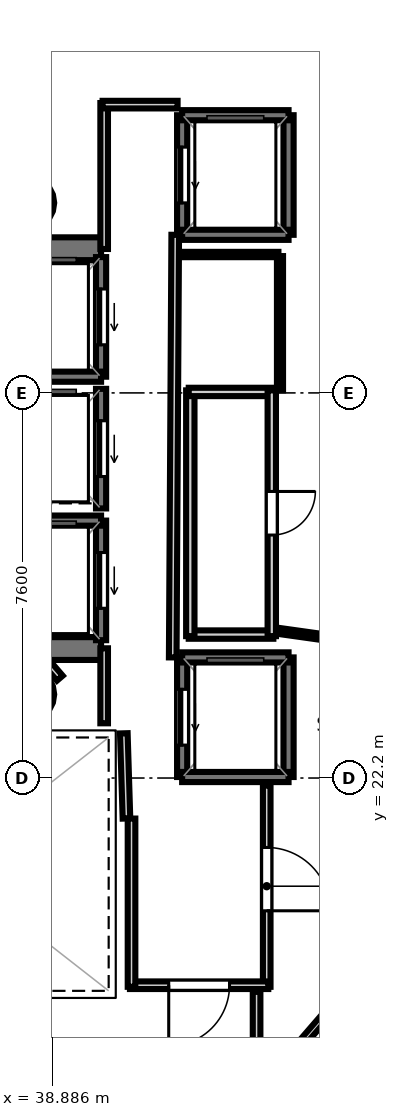
"""IFC4 building model, lengths in metres.
Left out: names, types, materials, properties, quantities, classifications, styles, units other than length and angle.
Written with IfcOpenShell. Run it as: python <this file> out.ifc"""

import sys

from ifc_helpers import new_model, si_unit, direction, frame, frame_2d, origin, origin_2d, place, context, subcontext, project, spatial, rectangle, hollow_circle, extrude, element, fill, save


model = new_model("IFC4")
c1 = context("Model", 3, precision=1e-05, world=origin(), true_north=direction((0.0, 1.0)))
c2 = subcontext(c1, "Body", "Model", "MODEL_VIEW")
j1 = project(units=[si_unit("LENGTHUNIT", "METRE"), si_unit("PLANEANGLEUNIT", "RADIAN")], contexts=[c1])
p1 = place(None, origin())
s1 = spatial("IfcSite", under=j1, at=p1, CompositionType="ELEMENT")
p2 = place(p1, origin())
s2 = spatial("IfcBuilding", under=s1, at=p2, CompositionType="ELEMENT")
p3 = place(p2, frame((0.0, 0.0, 253.8)))
s3 = spatial("IfcBuildingStorey", under=s2, at=p3, CompositionType="ELEMENT", Elevation=253.8)
p4 = place(p3, frame((29.33, 32.645, 0.0), z_axis=(0.0, 0.0, 1.0), x_axis=(1.0, 0.0, 0.0)))
e1 = element("IfcWall", 1, at=p4, inside=s3, PredefinedType="SHEAR", context=c2, shape_type="SweptSolid", body=[
    extrude(rectangle(XDim=10.52, YDim=0.45, at=frame_2d((5.26, 0.0))), origin(), (0.0, 0.0, 1.0), 3.52),
])
p5 = place(p4, frame((0.895, 0.0, 0.0)))
e2 = element("IfcOpeningElement", 2, at=p5, cuts=e1, PredefinedType="OPENING", context=c2, shape_type="SweptSolid", body=[
    extrude(rectangle(XDim=1.25, YDim=2.15, at=frame_2d((0.625, 1.075))), frame((0.0, 0.235, 0.0), z_axis=(0.0, -1.0, 0.0), x_axis=(1.0, 0.0, 0.0)), (0.0, 0.0, 1.0), 0.47),
])
p6 = place(p3, frame((29.33, 24.755, 0.0), z_axis=(0.0, 0.0, 1.0), x_axis=(1.0, 0.0, 0.0)))
e3 = element("IfcWall", 3, at=p6, inside=s3, PredefinedType="SHEAR", context=c2, shape_type="SweptSolid", body=[
    extrude(rectangle(XDim=10.52, YDim=0.45, at=frame_2d((5.26, 0.0))), origin(), (0.0, 0.0, 1.0), 3.52),
])
p7 = place(p6, frame((0.695, 0.0, 0.0)))
e4 = element("IfcOpeningElement", 4, at=p7, cuts=e3, PredefinedType="OPENING", context=c2, shape_type="SweptSolid", body=[
    extrude(rectangle(XDim=1.25, YDim=2.15, at=frame_2d((0.625, 1.075))), frame((0.0, 0.235, 0.0), z_axis=(0.0, -1.0, 0.0), x_axis=(1.0, 0.0, 0.0)), (0.0, 0.0, 1.0), 0.47),
])
for number, where, z_axis, x_axis in (
    (5, (38.4, 33.55, 0.0), (0.0, 0.0, 1.0), (1.0, 0.0, 0.0)),
    (6, (38.4, 23.85, 0.0), (0.0, 0.0, 1.0), (1.0, 0.0, 0.0)),
):
    element("IfcColumn", number, at=place(p3, frame(where, z_axis=z_axis, x_axis=x_axis)), inside=s3, PredefinedType="COLUMN", context=c2, shape_type="SweptSolid", body=[
        extrude(hollow_circle(Radius=0.525, WallThickness=0.028, at=origin_2d()), origin(), (0.0, 0.0, 1.0), 3.7),
    ])
p8 = place(p3, frame((39.85, 30.12, 0.0), z_axis=(0.0, 0.0, 1.0), x_axis=(0.0, 1.0, 0.0)))
e7 = element("IfcWall", 7, at=p8, inside=s3, PredefinedType="SOLIDWALL", context=c2, shape_type="SweptSolid", body=[
    extrude(rectangle(XDim=2.36, YDim=0.2, at=frame_2d((1.18, 0.0))), origin(), (0.0, 0.0, 1.0), 3.52),
])
p9 = place(p8, frame((0.63, 0.0, 0.0)))
e8 = element("IfcOpeningElement", 8, at=p9, cuts=e7, PredefinedType="OPENING", context=c2, shape_type="SweptSolid", body=[
    extrude(rectangle(XDim=1.1, YDim=2.15, at=frame_2d((0.55, 1.075))), frame((0.0, 0.11, 0.0), z_axis=(0.0, -1.0, 0.0), x_axis=(1.0, 0.0, 0.0)), (0.0, 0.0, 1.0), 0.22),
])
p10 = place(p3, frame((37.75, 30.12, 0.0), z_axis=(0.0, 0.0, 1.0), x_axis=(1.0, 0.0, 0.0)))
e9 = element("IfcWall", 9, at=p10, inside=s3, PredefinedType="SOLIDWALL", context=c2, shape_type="SweptSolid", body=[
    extrude(rectangle(XDim=2.1, YDim=0.2, at=frame_2d((1.05, 0.0))), origin(), (0.0, 0.0, 1.0), 3.52),
])
p11 = place(p3, frame((39.85, 24.92, 0.0), z_axis=(0.0, 0.0, 1.0), x_axis=(0.0, 1.0, 0.0)))
e10 = element("IfcWall", 10, at=p11, inside=s3, PredefinedType="SOLIDWALL", context=c2, shape_type="SweptSolid", body=[
    extrude(rectangle(XDim=2.36, YDim=0.2, at=frame_2d((1.18, 0.0))), origin(), (0.0, 0.0, 1.0), 3.52),
])
p12 = place(p11, frame((0.63, 0.0, 0.0)))
e11 = element("IfcOpeningElement", 11, at=p12, cuts=e10, PredefinedType="OPENING", context=c2, shape_type="SweptSolid", body=[
    extrude(rectangle(XDim=1.1, YDim=2.15, at=frame_2d((0.55, 1.075))), frame((0.0, 0.11, 0.0), z_axis=(0.0, -1.0, 0.0), x_axis=(1.0, 0.0, 0.0)), (0.0, 0.0, 1.0), 0.22),
])
p13 = place(p3, frame((37.75, 27.28, 0.0), z_axis=(0.0, 0.0, 1.0), x_axis=(1.0, 0.0, 0.0)))
e12 = element("IfcWall", 12, at=p13, inside=s3, PredefinedType="SOLIDWALL", context=c2, shape_type="SweptSolid", body=[
    extrude(rectangle(XDim=2.1, YDim=0.2, at=frame_2d((1.05, 0.0))), origin(), (0.0, 0.0, 1.0), 3.52),
])
p14 = place(p3, frame((39.85, 27.52, 0.0), z_axis=(0.0, 0.0, 1.0), x_axis=(0.0, 1.0, 0.0)))
e13 = element("IfcWall", 13, at=p14, inside=s3, PredefinedType="SOLIDWALL", context=c2, shape_type="SweptSolid", body=[
    extrude(rectangle(XDim=2.36, YDim=0.2, at=frame_2d((1.18, 0.0))), origin(), (0.0, 0.0, 1.0), 3.52),
])
p15 = place(p14, frame((0.63, 0.0, 0.0)))
e14 = element("IfcOpeningElement", 14, at=p15, cuts=e13, PredefinedType="OPENING", context=c2, shape_type="SweptSolid", body=[
    extrude(rectangle(XDim=1.1, YDim=2.15, at=frame_2d((0.55, 1.075))), frame((0.0, 0.11, 0.0), z_axis=(0.0, -1.0, 0.0), x_axis=(1.0, 0.0, 0.0)), (0.0, 0.0, 1.0), 0.22),
])
p16 = place(p3, frame((43.55, 22.22, 0.0), z_axis=(0.0, 0.0, 1.0), x_axis=(0.0, 1.0, 0.0)))
e15 = element("IfcWall", 15, at=p16, inside=s3, PredefinedType="SOLIDWALL", context=c2, shape_type="SweptSolid", body=[
    extrude(rectangle(XDim=2.36, YDim=0.2, at=frame_2d((1.18, 0.0))), origin(), (0.0, 0.0, 1.0), 3.52),
])
p17 = place(p3, frame((41.45, 22.22, 0.0), z_axis=(0.0, 0.0, 1.0), x_axis=(0.0, 1.0, 0.0)))
e16 = element("IfcWall", 16, at=p17, inside=s3, PredefinedType="SOLIDWALL", context=c2, shape_type="SweptSolid", body=[
    extrude(rectangle(XDim=2.36, YDim=0.2, at=frame_2d((1.18, 0.0))), origin(), (0.0, 0.0, 1.0), 3.52),
])
p18 = place(p17, frame((0.63, 0.0, 0.0)))
e17 = element("IfcOpeningElement", 17, at=p18, cuts=e16, PredefinedType="OPENING", context=c2, shape_type="SweptSolid", body=[
    extrude(rectangle(XDim=1.1, YDim=2.15, at=frame_2d((0.55, 1.075))), frame((0.0, 0.11, 0.0), z_axis=(0.0, -1.0, 0.0), x_axis=(1.0, 0.0, 0.0)), (0.0, 0.0, 1.0), 0.22),
])
for number, where, z_axis, x_axis in (
    (18, (41.45, 24.58, 0.0), (0.0, 0.0, 1.0), (1.0, 0.0, 0.0)),
    (19, (41.45, 22.22, 0.0), (0.0, 0.0, 1.0), (1.0, 0.0, 0.0)),
):
    element("IfcWall", number, at=place(p3, frame(where, z_axis=z_axis, x_axis=x_axis)), inside=s3, PredefinedType="SOLIDWALL", context=c2, shape_type="SweptSolid", body=[
        extrude(rectangle(XDim=2.1, YDim=0.2, at=frame_2d((1.05, 0.0))), origin(), (0.0, 0.0, 1.0), 3.52),
    ])
p19 = place(p3, frame((43.55, 32.92, 0.0), z_axis=(0.0, 0.0, 1.0), x_axis=(0.0, 1.0, 0.0)))
e20 = element("IfcWall", 20, at=p19, inside=s3, PredefinedType="SOLIDWALL", context=c2, shape_type="SweptSolid", body=[
    extrude(rectangle(XDim=2.36, YDim=0.2, at=frame_2d((1.18, 0.0))), origin(), (0.0, 0.0, 1.0), 3.52),
])
p20 = place(p3, frame((41.45, 32.92, 0.0), z_axis=(0.0, 0.0, 1.0), x_axis=(0.0, 1.0, 0.0)))
e21 = element("IfcWall", 21, at=p20, inside=s3, PredefinedType="SOLIDWALL", context=c2, shape_type="SweptSolid", body=[
    extrude(rectangle(XDim=2.36, YDim=0.2, at=frame_2d((1.18, 0.0))), origin(), (0.0, 0.0, 1.0), 3.52),
])
p21 = place(p20, frame((0.63, 0.0, 0.0)))
e22 = element("IfcOpeningElement", 22, at=p21, cuts=e21, PredefinedType="OPENING", context=c2, shape_type="SweptSolid", body=[
    extrude(rectangle(XDim=1.1, YDim=2.15, at=frame_2d((0.55, 1.075))), frame((0.0, 0.11, 0.0), z_axis=(0.0, -1.0, 0.0), x_axis=(1.0, 0.0, 0.0)), (0.0, 0.0, 1.0), 0.22),
])
for number, where, z_axis, x_axis in (
    (23, (41.45, 35.28, 0.0), (0.0, 0.0, 1.0), (1.0, 0.0, 0.0)),
    (24, (41.45, 32.92, 0.0), (0.0, 0.0, 1.0), (1.0, 0.0, 0.0)),
):
    element("IfcWall", number, at=place(p3, frame(where, z_axis=z_axis, x_axis=x_axis)), inside=s3, PredefinedType="SOLIDWALL", context=c2, shape_type="SweptSolid", body=[
        extrude(rectangle(XDim=2.1, YDim=0.2, at=frame_2d((1.05, 0.0))), origin(), (0.0, 0.0, 1.0), 3.52),
    ])
p22 = place(p3, frame((40.351, 21.401, 0.0), z_axis=(0.0, 0.0, 1.0), x_axis=(-0.031058045979, 0.999517582527, 0.0)))
e25 = element("IfcWall", 25, at=p22, inside=s3, PredefinedType="PARTITIONING", context=c2, shape_type="SweptSolid", body=[
    extrude(rectangle(XDim=1.682, YDim=0.15, at=frame_2d((0.841, 0.0))), origin(), (0.0, 0.0, 1.0), 2.84),
])
p23 = place(p3, frame((39.911, 23.28, 0.0), z_axis=(0.0, 0.0, 1.0), x_axis=(0.0, 1.0, 0.0)))
e26 = element("IfcWall", 26, at=p23, inside=s3, PredefinedType="PARTITIONING", context=c2, shape_type="SweptSolid", body=[
    extrude(rectangle(XDim=1.48, YDim=0.15, at=frame_2d((0.74, 0.0))), origin(), (0.0, 0.0, 1.0), 2.84),
])
p24 = place(p3, frame((39.911, 32.64, 0.0), z_axis=(0.0, 0.0, 1.0), x_axis=(0.0, 1.0, 0.0)))
e27 = element("IfcWall", 27, at=p24, inside=s3, PredefinedType="PARTITIONING", context=c2, shape_type="SweptSolid", body=[
    extrude(rectangle(XDim=2.88, YDim=0.15, at=frame_2d((1.44, 0.0))), origin(), (0.0, 0.0, 1.0), 2.84),
])
p25 = place(p3, frame((39.88, 35.489, 0.0), z_axis=(0.0, 0.0, 1.0), x_axis=(1.0, 0.0, 0.0)))
e28 = element("IfcWall", 28, at=p25, inside=s3, PredefinedType="PARTITIONING", context=c2, shape_type="SweptSolid", body=[
    extrude(rectangle(XDim=1.48, YDim=0.15, at=frame_2d((0.74, 0.0))), origin(), (0.0, 0.0, 1.0), 2.84),
])
p26 = place(p3, frame((41.313, 32.92, 0.0), z_axis=(0.0, 0.0, 1.0), x_axis=(-0.005942518022, -0.999982343084, 0.0)))
e29 = element("IfcWall", 29, at=p26, inside=s3, PredefinedType="PARTITIONING", context=c2, shape_type="SweptSolid", body=[
    extrude(rectangle(XDim=8.34, YDim=0.15, at=frame_2d((4.17, 0.0))), origin(), (0.0, 0.0, 1.0), 2.84),
])
p27 = place(p3, frame((43.119, 22.05, 0.0), z_axis=(0.0, 0.0, 1.0), x_axis=(0.0, -1.0, 0.0)))
e30 = element("IfcWall", 30, at=p27, inside=s3, PredefinedType="PARTITIONING", context=c2, shape_type="SweptSolid", body=[
    extrude(rectangle(XDim=3.97, YDim=0.15, at=frame_2d((1.985, 0.0))), origin(), (0.0, 0.0, 1.0), 2.84),
])
p28 = place(p27, frame((1.22, 0.0, 0.0)))
e31 = element("IfcOpeningElement", 31, at=p28, cuts=e30, PredefinedType="OPENING", context=c2, shape_type="SweptSolid", body=[
    extrude(rectangle(XDim=1.25, YDim=2.2, at=frame_2d((0.625, 1.1))), frame((0.0, 0.085, 0.0), z_axis=(0.0, -1.0, 0.0), x_axis=(1.0, 0.0, 0.0)), (0.0, 0.0, 1.0), 0.17),
])
p29 = place(p3, frame((43.15, 18.111, 0.0), z_axis=(0.0, 0.0, 1.0), x_axis=(-1.0, 0.0, 0.0)))
e32 = element("IfcWall", 32, at=p29, inside=s3, PredefinedType="PARTITIONING", context=c2, shape_type="SweptSolid", body=[
    extrude(rectangle(XDim=2.73, YDim=0.15, at=frame_2d((1.365, 0.0))), origin(), (0.0, 0.0, 1.0), 2.84),
])
p30 = place(p29, frame((0.765, 0.0, 0.0)))
e33 = element("IfcOpeningElement", 33, at=p30, cuts=e32, PredefinedType="OPENING", context=c2, shape_type="SweptSolid", body=[
    extrude(rectangle(XDim=1.2, YDim=2.15, at=frame_2d((0.6, 1.075))), frame((0.0, 0.085, 0.0), z_axis=(0.0, -1.0, 0.0), x_axis=(1.0, 0.0, 0.0)), (0.0, 0.0, 1.0), 0.17),
])
p31 = place(p3, frame((40.451, 18.08, 0.0), z_axis=(0.0, 0.0, 1.0), x_axis=(0.0, 1.0, 0.0)))
e34 = element("IfcWall", 34, at=p31, inside=s3, PredefinedType="PARTITIONING", context=c2, shape_type="SweptSolid", body=[
    extrude(rectangle(XDim=3.32, YDim=0.15, at=frame_2d((1.66, 0.0))), origin(), (0.0, 0.0, 1.0), 2.84),
])
p32 = place(p3, frame((43.25, 25.031, 0.0), z_axis=(0.0, 0.0, 1.0), x_axis=(-1.0, 0.0, 0.0)))
e35 = element("IfcWall", 35, at=p32, inside=s3, PredefinedType="PLUMBINGWALL", context=c2, shape_type="SweptSolid", body=[
    extrude(rectangle(XDim=1.67, YDim=0.165, at=frame_2d((0.835, 0.0))), origin(), (0.0, 0.0, 1.0), 2.84),
])
p33 = place(p3, frame((41.611, 25.0, 0.0), z_axis=(0.0, 0.0, 1.0), x_axis=(0.0, 1.0, 0.0)))
e36 = element("IfcWall", 36, at=p33, inside=s3, PredefinedType="PLUMBINGWALL", context=c2, shape_type="SweptSolid", body=[
    extrude(rectangle(XDim=4.85, YDim=0.165, at=frame_2d((2.425, 0.0))), origin(), (0.0, 0.0, 1.0), 2.84),
])
p34 = place(p3, frame((41.58, 29.819, 0.0), z_axis=(0.0, 0.0, 1.0), x_axis=(1.0, 0.0, 0.0)))
e37 = element("IfcWall", 37, at=p34, inside=s3, PredefinedType="PLUMBINGWALL", context=c2, shape_type="SweptSolid", body=[
    extrude(rectangle(XDim=1.67, YDim=0.165, at=frame_2d((0.835, 0.0))), origin(), (0.0, 0.0, 1.0), 2.84),
])
p35 = place(p3, frame((43.219, 29.85, 0.0), z_axis=(0.0, 0.0, 1.0), x_axis=(0.0, -1.0, 0.0)))
e38 = element("IfcWall", 38, at=p35, inside=s3, PredefinedType="PLUMBINGWALL", context=c2, shape_type="SweptSolid", body=[
    extrude(rectangle(XDim=4.85, YDim=0.165, at=frame_2d((2.425, 0.0))), origin(), (0.0, 0.0, 1.0), 2.84),
])
p36 = place(p35, frame((1.995, 0.0, 0.0)))
e39 = element("IfcOpeningElement", 39, at=p36, cuts=e38, PredefinedType="OPENING", context=c2, shape_type="SweptSolid", body=[
    extrude(rectangle(XDim=0.86, YDim=2.05, at=frame_2d((0.43, 1.025))), frame((0.0, 0.093, 0.0), z_axis=(0.0, -1.0, 0.0), x_axis=(1.0, 0.0, 0.0)), (0.0, 0.0, 1.0), 0.185),
])
p37 = place(p3, frame((39.036, 24.17, 0.0), z_axis=(0.0, 0.0, 1.0), x_axis=(-0.652260263346, 0.757995084984, 0.0)))
e40 = element("IfcWall", 40, at=p37, inside=s3, PredefinedType="PARTITIONING", context=c2, shape_type="SweptSolid", body=[
    extrude(rectangle(XDim=0.355, YDim=0.15, at=frame_2d((0.178, 0.0))), origin(), (0.0, 0.0, 1.0), 2.84),
])
p38 = place(p3, frame((42.919, 17.98, 0.0), z_axis=(0.0, 0.0, 1.0), x_axis=(0.0, -1.0, 0.0)))
e41 = element("IfcWall", 41, at=p38, inside=s3, PredefinedType="PARTITIONING", context=c2, shape_type="SweptSolid", body=[
    extrude(rectangle(XDim=2.909, YDim=0.15, at=frame_2d((1.454, 0.0))), origin(), (0.0, 0.0, 1.0), 2.84),
])
p39 = place(p3, frame((43.346, 25.105, 0.0), z_axis=(0.0, 0.0, 1.0), x_axis=(0.990268892061, -0.139167242611, 0.0)))
e42 = element("IfcWall", 42, at=p39, inside=s3, PredefinedType="PARTITIONING", context=c2, shape_type="SweptSolid", body=[
    extrude(rectangle(XDim=7.431, YDim=0.12, at=frame_2d((3.716, 0.0))), origin(), (0.0, 0.0, 1.0), 2.84),
])
p40 = place(p3, frame((46.952, 20.599, 0.0), z_axis=(0.0, 0.0, 1.0), x_axis=(-0.654038047912, -0.756461652619, 0.0)))
e43 = element("IfcWall", 43, at=p40, inside=s3, PredefinedType="PARTITIONING", context=c2, shape_type="SweptSolid", body=[
    extrude(rectangle(XDim=6.033, YDim=0.14, at=frame_2d((3.017, 0.0))), origin(), (0.0, 0.0, 1.0), 2.84),
])
p41 = place(p3, frame((21.853, 36.561, 0.0), z_axis=(0.0, 0.0, 1.0), x_axis=(0.999969554507, 0.007803208298, 0.0)))
e44 = element("IfcWall", 44, at=p41, inside=s3, PredefinedType="PARTITIONING", context=c2, shape_type="SweptSolid", body=[
    extrude(rectangle(XDim=34.76, YDim=0.14, at=frame_2d((17.38, 0.0))), origin(), (0.0, 0.0, 1.0), 2.84),
])
p42 = place(p3, frame((43.381, 29.85, 0.0), z_axis=(0.0, 0.0, 1.0), x_axis=(0.0, 1.0, 0.0)))
e45 = element("IfcWall", 45, at=p42, inside=s3, PredefinedType="PARTITIONING", context=c2, shape_type="SweptSolid", body=[
    extrude(rectangle(XDim=2.65, YDim=0.12, at=frame_2d((1.325, 0.0))), origin(), (0.0, 0.0, 1.0), 2.84),
])
p43 = place(p3, frame((43.35, 32.531, 0.0), z_axis=(0.0, 0.0, 1.0), x_axis=(-1.0, 0.0, 0.0)))
e46 = element("IfcWall", 46, at=p43, inside=s3, PredefinedType="PARTITIONING", context=c2, shape_type="SweptSolid", body=[
    extrude(rectangle(XDim=1.91, YDim=0.105, at=frame_2d((0.955, 0.0))), origin(), (0.0, 0.0, 1.0), 2.84),
])
p44 = place(p9, origin())
e47 = element("IfcDoor", 47, at=p44, inside=s3, OperationType="SLIDING_TO_LEFT", PredefinedType="DOOR", context=c2, shape_type="SweptSolid", body=[
    extrude(rectangle(XDim=1.1, YDim=2.15, at=frame_2d((0.55, 1.075))), frame((0.0, 0.025, 0.0), z_axis=(0.0, -1.0, 0.0), x_axis=(1.0, 0.0, 0.0)), (0.0, 0.0, 1.0), 0.05),
])
fill(e8, e47)
p45 = place(p12, origin())
e48 = element("IfcDoor", 48, at=p45, inside=s3, OperationType="SLIDING_TO_LEFT", PredefinedType="DOOR", context=c2, shape_type="SweptSolid", body=[
    extrude(rectangle(XDim=1.1, YDim=2.15, at=frame_2d((0.55, 1.075))), frame((0.0, 0.025, 0.0), z_axis=(0.0, -1.0, 0.0), x_axis=(1.0, 0.0, 0.0)), (0.0, 0.0, 1.0), 0.05),
])
fill(e11, e48)
p46 = place(p15, origin())
e49 = element("IfcDoor", 49, at=p46, inside=s3, OperationType="SLIDING_TO_LEFT", PredefinedType="DOOR", context=c2, shape_type="SweptSolid", body=[
    extrude(rectangle(XDim=1.1, YDim=2.15, at=frame_2d((0.55, 1.075))), frame((0.0, 0.025, 0.0), z_axis=(0.0, -1.0, 0.0), x_axis=(1.0, 0.0, 0.0)), (0.0, 0.0, 1.0), 0.05),
])
fill(e14, e49)
p47 = place(p18, origin())
e50 = element("IfcDoor", 50, at=p47, inside=s3, OperationType="SLIDING_TO_LEFT", PredefinedType="DOOR", context=c2, shape_type="SweptSolid", body=[
    extrude(rectangle(XDim=1.1, YDim=2.15, at=frame_2d((0.55, 1.075))), frame((0.0, 0.025, 0.0), z_axis=(0.0, -1.0, 0.0), x_axis=(1.0, 0.0, 0.0)), (0.0, 0.0, 1.0), 0.05),
])
fill(e17, e50)
p48 = place(p21, origin())
e51 = element("IfcDoor", 51, at=p48, inside=s3, OperationType="SLIDING_TO_LEFT", PredefinedType="DOOR", context=c2, shape_type="SweptSolid", body=[
    extrude(rectangle(XDim=1.1, YDim=2.15, at=frame_2d((0.55, 1.075))), frame((0.0, 0.025, 0.0), z_axis=(0.0, -1.0, 0.0), x_axis=(1.0, 0.0, 0.0)), (0.0, 0.0, 1.0), 0.05),
])
fill(e22, e51)
p49 = place(p30, origin())
e52 = element("IfcDoor", 52, at=p49, inside=s3, OperationType="SINGLE_SWING_RIGHT", PredefinedType="DOOR", context=c2, shape_type="SweptSolid", body=[
    extrude(rectangle(XDim=1.2, YDim=2.15, at=frame_2d((0.6, 1.075))), frame((0.0, 0.025, 0.0), z_axis=(0.0, -1.0, 0.0), x_axis=(1.0, 0.0, 0.0)), (0.0, 0.0, 1.0), 0.05),
])
fill(e33, e52)
p50 = place(p28, origin())
e53 = element("IfcDoor", 53, at=p50, inside=s3, OperationType="SINGLE_SWING_RIGHT", PredefinedType="DOOR", context=c2, shape_type="SweptSolid", body=[
    extrude(rectangle(XDim=1.25, YDim=2.2, at=frame_2d((0.625, 1.1))), frame((0.0, 0.025, 0.0), z_axis=(0.0, -1.0, 0.0), x_axis=(1.0, 0.0, 0.0)), (0.0, 0.0, 1.0), 0.05),
])
fill(e31, e53)
p51 = place(p36, origin())
e54 = element("IfcDoor", 54, at=p51, inside=s3, OperationType="SINGLE_SWING_LEFT", PredefinedType="DOOR", context=c2, shape_type="SweptSolid", body=[
    extrude(rectangle(XDim=0.86, YDim=2.05, at=frame_2d((0.43, 1.025))), frame((0.0, 0.025, 0.0), z_axis=(0.0, -1.0, 0.0), x_axis=(1.0, 0.0, 0.0)), (0.0, 0.0, 1.0), 0.05),
])
fill(e39, e54)
save(model, sys.argv[1])
